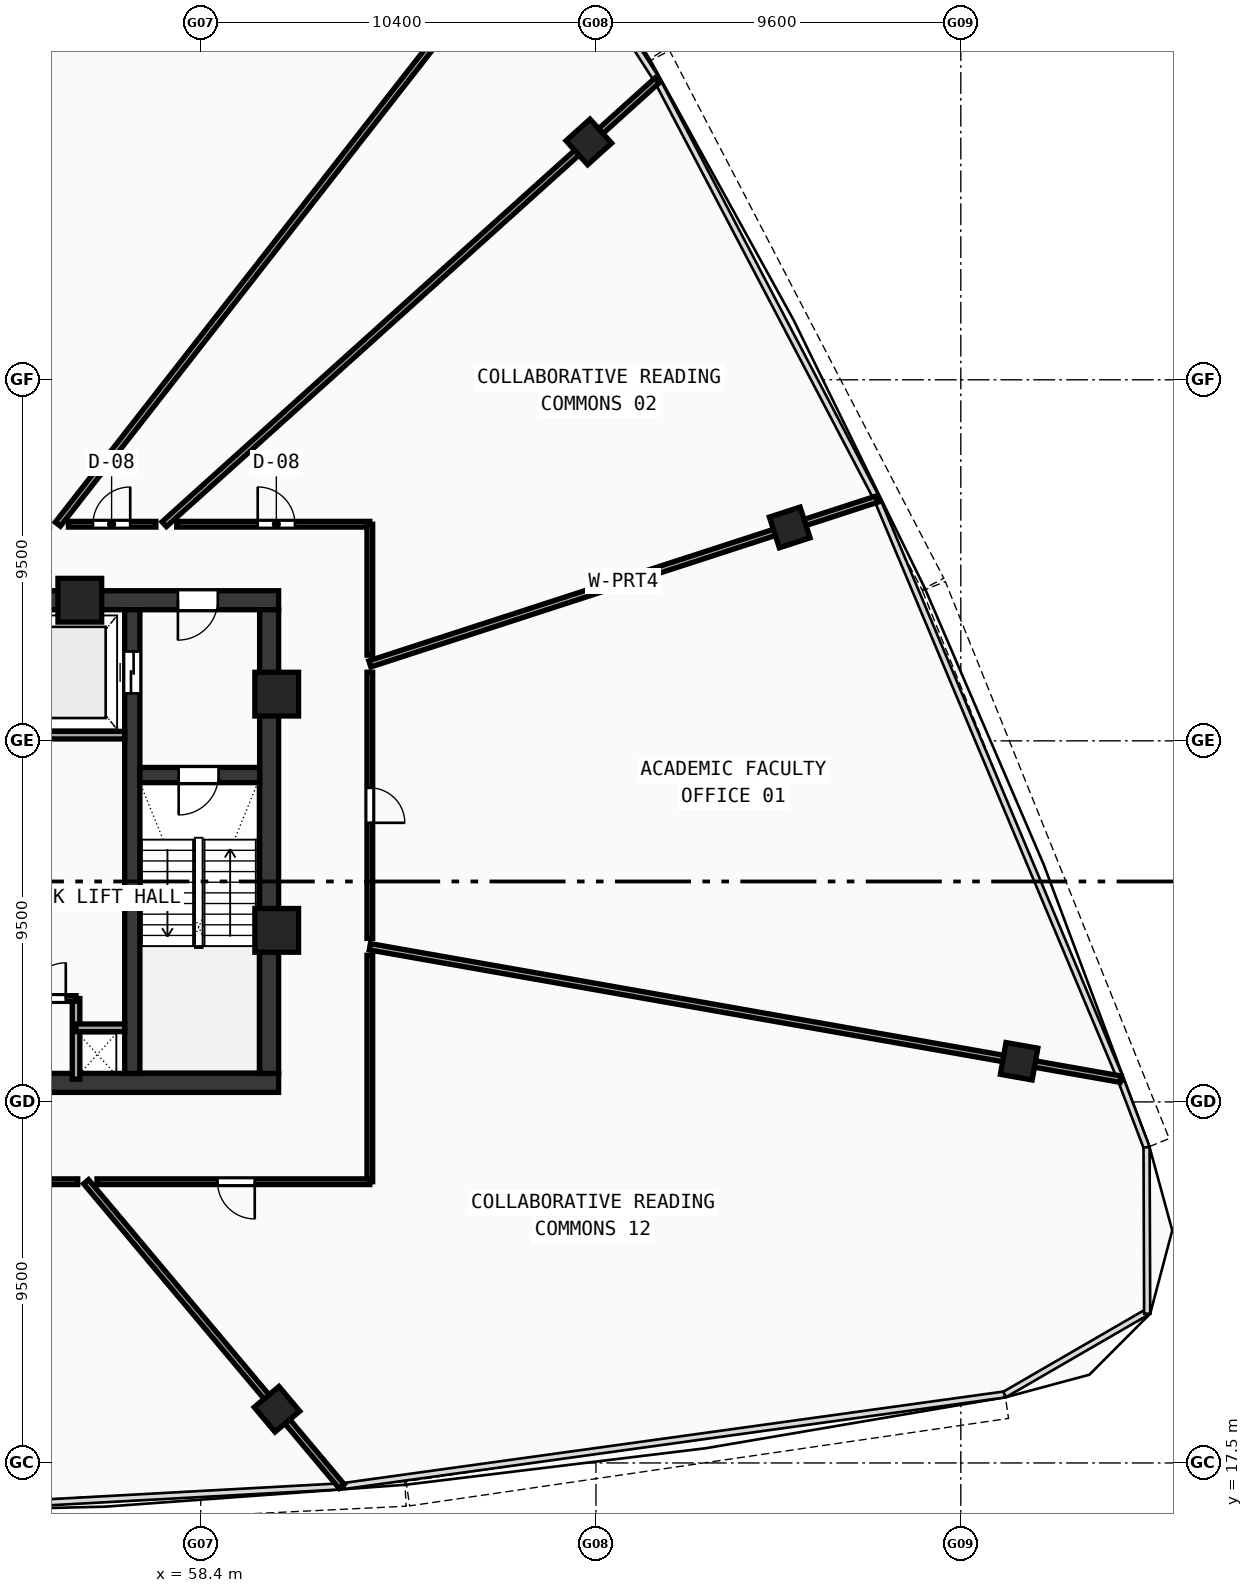
"""IFC4 building model, lengths in metres.
Left out: names, types, materials, properties, quantities, classifications, styles, units other than length and angle.
Written with IfcOpenShell. Run it as: python <this file> out.ifc"""

import sys

from ifc_helpers import new_model, si_unit, direction, frame, frame_2d, origin, origin_with_axes, origin_2d, place, context, subcontext, project, spatial, rectangle, hollow_rectangle, extrude, source, transform, mapped, element, fill, save


model = new_model("IFC4")
c1 = context("Model", 3, precision=1e-05, world=origin(), true_north=direction((0.0, 1.0)))
c2 = subcontext(c1, "Body", "Model", "MODEL_VIEW")
j1 = project(units=[si_unit("LENGTHUNIT", "METRE"), si_unit("PLANEANGLEUNIT", "RADIAN")], contexts=[c1])
p1 = place(None, origin())
s1 = spatial("IfcSite", under=j1, at=p1, CompositionType="ELEMENT")
p2 = place(p1, origin())
s2 = spatial("IfcBuilding", under=s1, at=p2, CompositionType="ELEMENT")
p3 = place(p2, frame((0.0, 0.0, 244.53)))
s3 = spatial("IfcBuildingStorey", under=s2, at=p3, CompositionType="ELEMENT", Elevation=244.53)
p4 = place(p3, frame((35.55, 27.5, 0.0), z_axis=(0.0, 0.0, 1.0), x_axis=(1.0, 0.0, 0.0)))
e1 = element("IfcWall", 1, at=p4, inside=s3, PredefinedType="SHEAR", context=c2, shape_type="SweptSolid", body=[
    extrude(rectangle(XDim=24.9, YDim=0.5, at=frame_2d((12.45, 0.0))), origin(), (0.0, 0.0, 1.0), 3.47),
])
p5 = place(p3, frame((49.2, 40.2, 0.0), z_axis=(0.0, 0.0, 1.0), x_axis=(1.0, 0.0, 0.0)))
e2 = element("IfcWall", 2, at=p5, inside=s3, PredefinedType="SHEAR", context=c2, shape_type="SweptSolid", body=[
    extrude(rectangle(XDim=11.25, YDim=0.5, at=frame_2d((5.625, 0.0))), origin(), (0.0, 0.0, 1.0), 3.47),
])
p6 = place(p5, frame((8.6, 0.0, 0.0)))
e3 = element("IfcOpeningElement", 3, at=p6, cuts=e2, PredefinedType="OPENING", context=c2, shape_type="SweptSolid", body=[
    extrude(rectangle(XDim=1.05, YDim=2.1, at=frame_2d((0.525, 1.05))), frame((0.0, 0.26, 0.0), z_axis=(0.0, -1.0, 0.0), x_axis=(1.0, 0.0, 0.0)), (0.0, 0.0, 1.0), 0.52),
])
p7 = place(p3, frame((60.2, 27.75, 0.0), z_axis=(0.0, 0.0, 1.0), x_axis=(0.0, 1.0, 0.0)))
e4 = element("IfcWall", 4, at=p7, inside=s3, PredefinedType="SHEAR", context=c2, shape_type="SweptSolid", body=[
    extrude(rectangle(XDim=12.2, YDim=0.5, at=frame_2d((6.1, 0.0))), origin(), (0.0, 0.0, 1.0), 3.47),
])
p8 = place(p3, frame((56.6, 27.75, 0.0), z_axis=(0.0, 0.0, 1.0), x_axis=(0.0, 1.0, 0.0)))
e5 = element("IfcWall", 5, at=p8, inside=s3, PredefinedType="SHEAR", context=c2, shape_type="SweptSolid", body=[
    extrude(rectangle(XDim=12.2, YDim=0.4, at=frame_2d((6.1, 0.0))), origin(), (0.0, 0.0, 1.0), 3.47),
])
p9 = place(p8, frame((10.0, 0.0, 0.0)))
e6 = element("IfcOpeningElement", 6, at=p9, cuts=e5, PredefinedType="OPENING", context=c2, shape_type="SweptSolid", body=[
    extrude(rectangle(XDim=1.1, YDim=2.1, at=frame_2d((0.55, 1.05))), frame((0.0, 0.21, 0.0), z_axis=(0.0, -1.0, 0.0), x_axis=(1.0, 0.0, 0.0)), (0.0, 0.0, 1.0), 0.42),
])
p10 = place(p3, frame((56.8, 35.6, 0.0), z_axis=(0.0, 0.0, 1.0), x_axis=(1.0, 0.0, 0.0)))
e7 = element("IfcWall", 7, at=p10, inside=s3, PredefinedType="SHEAR", context=c2, shape_type="SweptSolid", body=[
    extrude(rectangle(XDim=3.15, YDim=0.4, at=frame_2d((1.575, 0.0))), origin(), (0.0, 0.0, 1.0), 3.47),
])
p11 = place(p10, frame((1.02, 0.0, 0.0)))
e8 = element("IfcOpeningElement", 8, at=p11, cuts=e7, PredefinedType="OPENING", context=c2, shape_type="SweptSolid", body=[
    extrude(rectangle(XDim=1.05, YDim=2.1, at=frame_2d((0.525, 1.05))), frame((0.0, 0.21, 0.0), z_axis=(0.0, -1.0, 0.0), x_axis=(1.0, 0.0, 0.0)), (0.0, 0.0, 1.0), 0.42),
])
m1 = source(origin(), c2, "Body", "SweptSolid", [
    extrude(hollow_rectangle(XDim=1.15, YDim=1.15, WallThickness=0.048, at=origin_2d()), origin(), (0.0, 0.0, 1.0), 3.73),
])
for number, where, z_axis, x_axis in (
    (9, (60.4, 31.513, -0.26), (0.0, 0.0, 1.0), (1.0, 0.0, 0.0)),
    (10, (60.4, 37.729, -0.26), (0.0, 0.0, 1.0), (1.0, 0.0, 0.0)),
    (11, (55.219, 40.2, -0.26), (0.0, 0.0, 1.0), (1.0, 0.0, 0.0)),
):
    element("IfcColumn", number, at=place(p3, frame(where, z_axis=z_axis, x_axis=x_axis)), inside=s3, PredefinedType="COLUMN", context=c2, shape_type="MappedRepresentation", body=[
        mapped(m1, transform((0.0, 0.0, 0.0), scale=1.0)),
    ])
m2 = source(origin(), c2, "Body", "SweptSolid", [
    extrude(hollow_rectangle(XDim=0.85, YDim=0.85, WallThickness=0.034, at=origin_2d()), origin(), (0.0, 0.0, 1.0), 3.73),
])
for number, where, z_axis, x_axis in (
    (12, (60.407, 18.914, -0.26), (0.0, 0.0, 1.0), (0.766, 0.643, 0.0)),
    (13, (79.934, 28.069, -0.26), (0.0, 0.0, 1.0), (0.174, 0.985, 0.0)),
    (14, (73.899, 42.115, -0.26), (0.0, 0.0, 1.0), (-0.309, 0.951, 0.0)),
    (15, (68.612, 52.259, -0.26), (0.0, 0.0, 1.0), (-0.669, 0.743, 0.0)),
):
    element("IfcColumn", number, at=place(p3, frame(where, z_axis=z_axis, x_axis=x_axis)), inside=s3, PredefinedType="COLUMN", context=c2, shape_type="MappedRepresentation", body=[
        mapped(m2, transform((0.0, 0.0, 0.0), scale=1.0)),
    ])
p12 = place(p3, frame((53.68, 36.65, 0.0), z_axis=(0.0, 0.0, 1.0), x_axis=(1.0, 0.0, 0.0)))
e16 = element("IfcWall", 16, at=p12, inside=s3, PredefinedType="SOLIDWALL", context=c2, shape_type="SweptSolid", body=[
    extrude(rectangle(XDim=2.72, YDim=0.2, at=frame_2d((1.36, 0.0))), origin(), (0.0, 0.0, 1.0), 3.47),
])
p13 = place(p3, frame((55.12, 27.6, 0.0), z_axis=(0.0, 0.0, 1.0), x_axis=(0.0, 1.0, 0.0)))
e17 = element("IfcWall", 17, at=p13, inside=s3, PredefinedType="SOLIDWALL", context=c2, shape_type="SweptSolid", body=[
    extrude(rectangle(XDim=2.12, YDim=0.2, at=frame_2d((1.06, 0.0))), origin(), (0.0, 0.0, 1.0), 3.47),
])
p14 = place(p3, frame((55.12, 28.95, 0.0), z_axis=(0.0, 0.0, 1.0), x_axis=(1.0, 0.0, 0.0)))
e18 = element("IfcWall", 18, at=p14, inside=s3, PredefinedType="SOLIDWALL", context=c2, shape_type="SweptSolid", body=[
    extrude(rectangle(XDim=1.28, YDim=0.2, at=frame_2d((0.64, 0.0))), origin(), (0.0, 0.0, 1.0), 3.47),
])
p15 = place(p3, frame((51.05, 29.72, 0.0), z_axis=(0.0, 0.0, 1.0), x_axis=(1.0, 0.0, 0.0)))
e19 = element("IfcWall", 19, at=p15, inside=s3, PredefinedType="PARTITIONING", context=c2, shape_type="SweptSolid", body=[
    extrude(rectangle(XDim=4.07, YDim=0.15, at=frame_2d((2.035, 0.0))), origin(), (0.0, 0.0, 1.0), 3.47),
])
p16 = place(p15, frame((0.3, 0.0, 0.0)))
e20 = element("IfcOpeningElement", 20, at=p16, cuts=e19, PredefinedType="OPENING", context=c2, shape_type="SweptSolid", body=[
    extrude(rectangle(XDim=0.9, YDim=2.1, at=frame_2d((0.45, 1.05))), frame((0.0, 0.085, 0.0), z_axis=(0.0, -1.0, 0.0), x_axis=(1.0, 0.0, 0.0)), (0.0, 0.0, 1.0), 0.17),
])
p17 = place(p15, frame((2.86, 0.0, 0.0)))
e21 = element("IfcOpeningElement", 21, at=p17, cuts=e19, PredefinedType="OPENING", context=c2, shape_type="SweptSolid", body=[
    extrude(rectangle(XDim=0.94, YDim=2.1, at=frame_2d((0.47, 1.05))), frame((0.0, 0.085, 0.0), z_axis=(0.0, -1.0, 0.0), x_axis=(1.0, 0.0, 0.0)), (0.0, 0.0, 1.0), 0.17),
])
p18 = place(p3, frame((62.85, 38.525, 0.0), z_axis=(0.0, 0.0, 1.0), x_axis=(0.951060404644, 0.309005027011, 0.0)))
e22 = element("IfcWall", 22, at=p18, inside=s3, PredefinedType="PARTITIONING", context=c2, shape_type="SweptSolid", body=[
    extrude(rectangle(XDim=14.032, YDim=0.17, at=frame_2d((7.016, 0.0))), origin(), (0.0, 0.0, 1.0), 2.82),
])
p19 = place(p3, frame((57.44, 42.2, 0.0), z_axis=(0.0, 0.0, 1.0), x_axis=(0.743140424774, 0.669135493802, 0.0)))
e23 = element("IfcWall", 23, at=p19, inside=s3, PredefinedType="PARTITIONING", context=c2, shape_type="SweptSolid", body=[
    extrude(rectangle(XDim=17.455, YDim=0.17, at=frame_2d((8.728, 0.0))), origin(), (0.0, 0.0, 1.0), 2.82),
])
p20 = place(p3, frame((54.641, 42.2, 0.0), z_axis=(0.0, 0.0, 1.0), x_axis=(0.615664824624, 0.788008136837, 0.0)))
e24 = element("IfcWall", 24, at=p20, inside=s3, PredefinedType="PARTITIONING", context=c2, shape_type="SweptSolid", body=[
    extrude(rectangle(XDim=20.745, YDim=0.17, at=frame_2d((10.372, 0.0))), origin(), (0.0, 0.0, 1.0), 2.82),
])
p21 = place(p3, frame((55.384, 24.9, 0.0), z_axis=(0.0, 0.0, 1.0), x_axis=(0.642788120563, -0.766044014443, 0.0)))
e25 = element("IfcWall", 25, at=p21, inside=s3, PredefinedType="PARTITIONING", context=c2, shape_type="SweptSolid", body=[
    extrude(rectangle(XDim=10.462, YDim=0.17, at=frame_2d((5.231, 0.0))), origin(), (0.0, 0.0, 1.0), 2.82),
])
p22 = place(p3, frame((62.85, 31.082, 0.0), z_axis=(0.0, 0.0, 1.0), x_axis=(0.984808421785, -0.173644384824, 0.0)))
e26 = element("IfcWall", 26, at=p22, inside=s3, PredefinedType="PARTITIONING", context=c2, shape_type="SweptSolid", body=[
    extrude(rectangle(XDim=20.059, YDim=0.17, at=frame_2d((10.03, 0.0))), origin(), (0.0, 0.0, 1.0), 2.82),
])
p23 = place(p3, frame((54.92, 42.2, 0.0), z_axis=(0.0, 0.0, 1.0), x_axis=(1.0, 0.0, 0.0)))
e27 = element("IfcWall", 27, at=p23, inside=s3, PredefinedType="PARTITIONING", context=c2, shape_type="SweptSolid", body=[
    extrude(rectangle(XDim=2.3, YDim=0.15, at=frame_2d((1.15, 0.0))), origin(), (0.0, 0.0, 1.0), 2.82),
])
p24 = place(p23, frame((0.646, 0.0, 0.0)))
e28 = element("IfcOpeningElement", 28, at=p24, cuts=e27, PredefinedType="OPENING", context=c2, shape_type="SweptSolid", body=[
    extrude(rectangle(XDim=0.98, YDim=2.12, at=frame_2d((0.49, 1.06))), frame((0.0, 0.085, 0.0), z_axis=(0.0, -1.0, 0.0), x_axis=(1.0, 0.0, 0.0)), (0.0, 0.0, 1.0), 0.17),
])
p25 = place(p3, frame((57.769, 42.2, 0.0), z_axis=(0.0, 0.0, 1.0), x_axis=(1.0, 0.0, 0.0)))
e29 = element("IfcWall", 29, at=p25, inside=s3, PredefinedType="PARTITIONING", context=c2, shape_type="SweptSolid", body=[
    extrude(rectangle(XDim=5.081, YDim=0.15, at=frame_2d((2.541, 0.0))), origin(), (0.0, 0.0, 1.0), 3.12),
])
p26 = place(p25, frame((2.131, 0.0, 0.0)))
e30 = element("IfcOpeningElement", 30, at=p26, cuts=e29, PredefinedType="OPENING", context=c2, shape_type="SweptSolid", body=[
    extrude(rectangle(XDim=0.98, YDim=2.12, at=frame_2d((0.49, 1.06))), frame((0.0, 0.085, 0.0), z_axis=(0.0, -1.0, 0.0), x_axis=(1.0, 0.0, 0.0)), (0.0, 0.0, 1.0), 0.17),
])
p27 = place(p3, frame((62.85, 42.2, 0.0), z_axis=(0.0, 0.0, 1.0), x_axis=(0.0, -1.0, 0.0)))
e31 = element("IfcWall", 31, at=p27, inside=s3, PredefinedType="PARTITIONING", context=c2, shape_type="SweptSolid", body=[
    extrude(rectangle(XDim=3.444, YDim=0.15, at=frame_2d((1.722, 0.0))), origin(), (0.0, 0.0, 1.0), 3.12),
])
p28 = place(p3, frame((62.85, 38.305, 0.0), z_axis=(0.0, 0.0, 1.0), x_axis=(0.0, -1.0, 0.0)))
e32 = element("IfcWall", 32, at=p28, inside=s3, PredefinedType="PARTITIONING", context=c2, shape_type="SweptSolid", body=[
    extrude(rectangle(XDim=7.004, YDim=0.15, at=frame_2d((3.502, 0.0))), origin(), (0.0, 0.0, 1.0), 3.47),
])
p29 = place(p28, frame((3.042, 0.0, 0.0)))
e33 = element("IfcOpeningElement", 33, at=p29, cuts=e32, PredefinedType="OPENING", context=c2, shape_type="SweptSolid", body=[
    extrude(rectangle(XDim=0.92, YDim=2.1, at=frame_2d((0.46, 1.05))), frame((0.0, 0.085, 0.0), z_axis=(0.0, -1.0, 0.0), x_axis=(1.0, 0.0, 0.0)), (0.0, 0.0, 1.0), 0.17),
])
p30 = place(p3, frame((62.85, 30.858, 0.0), z_axis=(0.0, 0.0, 1.0), x_axis=(0.0, -1.0, 0.0)))
e34 = element("IfcWall", 34, at=p30, inside=s3, PredefinedType="PARTITIONING", context=c2, shape_type="SweptSolid", body=[
    extrude(rectangle(XDim=5.958, YDim=0.15, at=frame_2d((2.979, 0.0))), origin(), (0.0, 0.0, 1.0), 3.12),
])
p31 = place(p3, frame((62.85, 24.9, 0.0), z_axis=(0.0, 0.0, 1.0), x_axis=(-1.0, 0.0, 0.0)))
e35 = element("IfcWall", 35, at=p31, inside=s3, PredefinedType="PARTITIONING", context=c2, shape_type="SweptSolid", body=[
    extrude(rectangle(XDim=7.179, YDim=0.15, at=frame_2d((3.589, 0.0))), origin(), (0.0, 0.0, 1.0), 3.12),
])
p32 = place(p31, frame((3.028, 0.0, 0.0)))
e36 = element("IfcOpeningElement", 36, at=p32, cuts=e35, PredefinedType="OPENING", context=c2, shape_type="SweptSolid", body=[
    extrude(rectangle(XDim=0.98, YDim=2.12, at=frame_2d((0.49, 1.06))), frame((0.0, 0.085, 0.0), z_axis=(0.0, -1.0, 0.0), x_axis=(1.0, 0.0, 0.0)), (0.0, 0.0, 1.0), 0.17),
])
p33 = place(p3, frame((55.164, 24.9, 0.0), z_axis=(0.0, 0.0, 1.0), x_axis=(-1.0, 0.0, 0.0)))
e37 = element("IfcWall", 37, at=p33, inside=s3, PredefinedType="PARTITIONING", context=c2, shape_type="SweptSolid", body=[
    extrude(rectangle(XDim=4.579, YDim=0.15, at=frame_2d((2.289, 0.0))), origin(), (0.0, 0.0, 1.0), 2.82),
])
p34 = place(p33, frame((1.818, 0.0, 0.0)))
e38 = element("IfcOpeningElement", 38, at=p34, cuts=e37, PredefinedType="OPENING", context=c2, shape_type="SweptSolid", body=[
    extrude(rectangle(XDim=0.98, YDim=2.12, at=frame_2d((0.49, 1.06))), frame((0.0, 0.085, 0.0), z_axis=(0.0, -1.0, 0.0), x_axis=(1.0, 0.0, 0.0)), (0.0, 0.0, 1.0), 0.17),
])
m3 = source(origin(), c2, "Body", "SweptSolid", [
    extrude(rectangle(XDim=1.05, YDim=2.1, at=frame_2d((0.525, 1.05))), frame((0.0, 0.025, 0.0), z_axis=(0.0, -1.0, 0.0), x_axis=(1.0, 0.0, 0.0)), (0.0, 0.0, 1.0), 0.05),
])
p35 = place(p11, frame((1.05, 0.0, 0.0), z_axis=(0.0, 0.0, 1.0), x_axis=(-1.0, 0.0, 0.0)))
e39 = element("IfcDoor", 39, at=p35, inside=s3, OperationType="SINGLE_SWING_RIGHT", PredefinedType="DOOR", context=c2, shape_type="MappedRepresentation", body=[
    mapped(m3, transform((0.0, 0.0, 0.0), scale=1.0)),
])
fill(e8, e39)
p36 = place(p6, frame((1.05, 0.0, 0.0), z_axis=(0.0, 0.0, 1.0), x_axis=(-1.0, 0.0, 0.0)))
e40 = element("IfcDoor", 40, at=p36, inside=s3, OperationType="SINGLE_SWING_RIGHT", PredefinedType="DOOR", context=c2, shape_type="MappedRepresentation", body=[
    mapped(m3, transform((0.0, 0.0, 0.0), scale=1.0)),
])
fill(e3, e40)
m4 = source(origin(), c2, "Body", "SweptSolid", [
    extrude(rectangle(XDim=1.1, YDim=2.1, at=frame_2d((0.55, 1.05))), frame((0.0, 0.025, 0.0), z_axis=(0.0, -1.0, 0.0), x_axis=(1.0, 0.0, 0.0)), (0.0, 0.0, 1.0), 0.05),
])
p37 = place(p9, origin_with_axes())
e41 = element("IfcDoor", 41, at=p37, inside=s3, OperationType="DOUBLE_DOOR_SLIDING", PredefinedType="DOOR", context=c2, shape_type="MappedRepresentation", body=[
    mapped(m4, transform((0.0, 0.0, 0.0), scale=1.0)),
])
fill(e6, e41)
m5 = source(origin(), c2, "Body", "SweptSolid", [
    extrude(rectangle(XDim=0.94, YDim=2.1, at=frame_2d((0.47, 1.05))), frame((0.0, 0.025, 0.0), z_axis=(0.0, -1.0, 0.0), x_axis=(1.0, 0.0, 0.0)), (0.0, 0.0, 1.0), 0.05),
])
p38 = place(p17, origin_with_axes())
e42 = element("IfcDoor", 42, at=p38, inside=s3, OperationType="SINGLE_SWING_RIGHT", PredefinedType="DOOR", context=c2, shape_type="MappedRepresentation", body=[
    mapped(m5, transform((0.0, 0.0, 0.0), scale=1.0)),
])
fill(e21, e42)
m6 = source(origin(), c2, "Body", "SweptSolid", [
    extrude(rectangle(XDim=0.92, YDim=2.1, at=frame_2d((0.46, 1.05))), frame((0.0, 0.025, 0.0), z_axis=(0.0, -1.0, 0.0), x_axis=(1.0, 0.0, 0.0)), (0.0, 0.0, 1.0), 0.05),
])
p39 = place(p29, origin_with_axes())
e43 = element("IfcDoor", 43, at=p39, inside=s3, OperationType="SINGLE_SWING_RIGHT", PredefinedType="DOOR", context=c2, shape_type="MappedRepresentation", body=[
    mapped(m6, transform((0.0, 0.0, 0.0), scale=1.0)),
])
fill(e33, e43)
m7 = source(origin(), c2, "Body", "SweptSolid", [
    extrude(rectangle(XDim=0.98, YDim=2.12, at=frame_2d((0.49, 1.06))), frame((0.0, 0.025, 0.0), z_axis=(0.0, -1.0, 0.0), x_axis=(1.0, 0.0, 0.0)), (0.0, 0.0, 1.0), 0.05),
])
p40 = place(p26, origin_with_axes())
e44 = element("IfcDoor", 44, at=p40, inside=s3, OperationType="SINGLE_SWING_LEFT", PredefinedType="DOOR", context=c2, shape_type="MappedRepresentation", body=[
    mapped(m7, transform((0.0, 0.0, 0.0), scale=1.0)),
])
fill(e30, e44)
p41 = place(p24, origin_with_axes())
e45 = element("IfcDoor", 45, at=p41, inside=s3, OperationType="SINGLE_SWING_RIGHT", PredefinedType="DOOR", context=c2, shape_type="MappedRepresentation", body=[
    mapped(m7, transform((0.0, 0.0, 0.0), scale=1.0)),
])
fill(e28, e45)
p42 = place(p32, origin_with_axes())
e46 = element("IfcDoor", 46, at=p42, inside=s3, OperationType="SINGLE_SWING_LEFT", PredefinedType="DOOR", context=c2, shape_type="MappedRepresentation", body=[
    mapped(m7, transform((0.0, 0.0, 0.0), scale=1.0)),
])
fill(e36, e46)
save(model, sys.argv[1])
